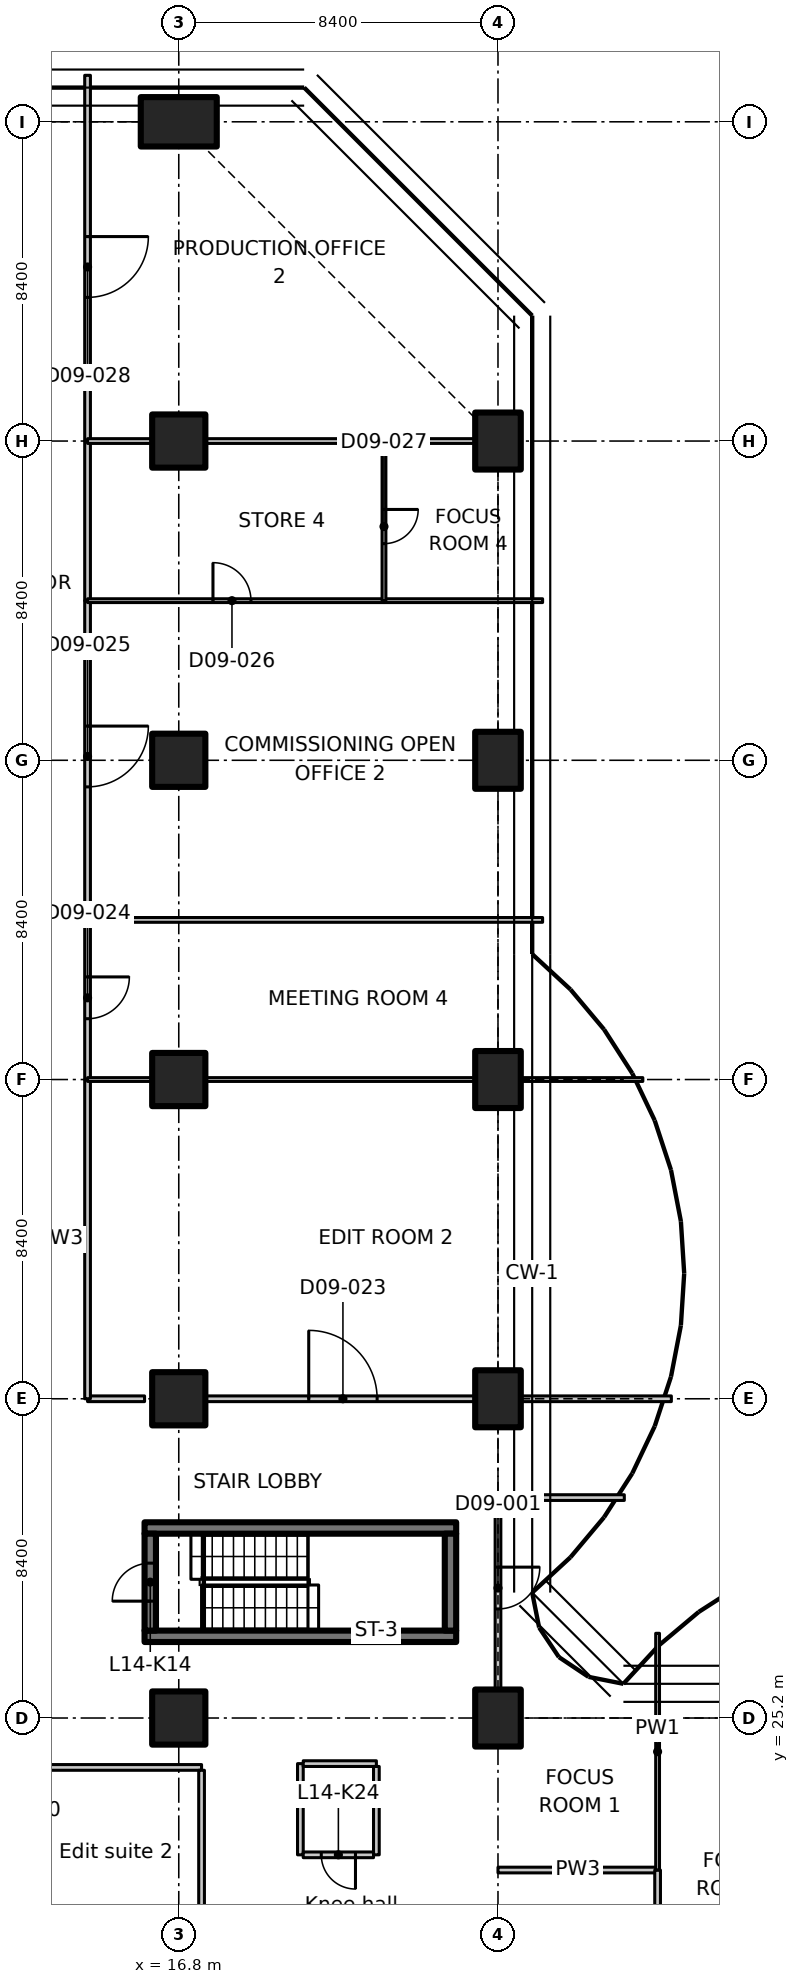
"""IFC4 building model, lengths in metres.
Left out: names, types, materials, properties, quantities, classifications, styles, units other than length and angle.
Written with IfcOpenShell. Run it as: python <this file> out.ifc"""

import sys

from ifc_helpers import new_model, si_unit, direction, frame, frame_2d, origin, origin_2d, place, context, subcontext, project, spatial, polyline, rectangle, outline, extrude, element, fill, save


model = new_model("IFC4")
c1 = context("Model", 3, precision=1e-05, world=origin(), true_north=direction((0.0, 1.0)))
c2 = subcontext(c1, "Body", "Model", "MODEL_VIEW")
j1 = project(units=[si_unit("LENGTHUNIT", "METRE"), si_unit("PLANEANGLEUNIT", "RADIAN")], contexts=[c1])
p1 = place(None, origin())
s1 = spatial("IfcSite", under=j1, at=p1, CompositionType="ELEMENT")
p2 = place(p1, origin())
s2 = spatial("IfcBuilding", under=s1, at=p2, CompositionType="ELEMENT")
p3 = place(p2, frame((0.0, 0.0, 65.3)))
s3 = spatial("IfcBuildingStorey", under=s2, at=p3, CompositionType="ELEMENT", Elevation=65.3)
for number, where, z_axis, x_axis in (
    (1, (16.8, 25.2, 0.0), (0.0, 0.0, 1.0), (1.0, 0.0, 0.0)),
    (2, (16.8, 33.6, 0.0), (0.0, 0.0, 1.0), (1.0, 0.0, 0.0)),
    (3, (16.8, 42.0, 0.0), (0.0, 0.0, 1.0), (1.0, 0.0, 0.0)),
    (4, (16.8, 50.4, 0.0), (0.0, 0.0, 1.0), (1.0, 0.0, 0.0)),
    (5, (16.8, 58.8, 0.0), (0.0, 0.0, 1.0), (1.0, 0.0, 0.0)),
):
    element("IfcColumn", number, at=place(p3, frame(where, z_axis=z_axis, x_axis=x_axis)), inside=s3, PredefinedType="COLUMN", context=c2, shape_type="SweptSolid", body=[
        extrude(rectangle(XDim=1.4, YDim=1.4, at=origin_2d()), origin(), (0.0, 0.0, 1.0), 3.35),
    ])
p4 = place(p3, frame((16.8, 67.2, 0.0), z_axis=(0.0, 0.0, 1.0), x_axis=(0.0, 1.0, 0.0)))
e6 = element("IfcColumn", 6, at=p4, inside=s3, PredefinedType="COLUMN", context=c2, shape_type="SweptSolid", body=[
    extrude(rectangle(XDim=1.3, YDim=2.0, at=origin_2d()), origin(), (0.0, 0.0, 1.0), 3.35),
])
for number, where, z_axis, x_axis in (
    (7, (25.2, 25.2, 0.0), (0.0, 0.0, 1.0), (1.0, 0.0, 0.0)),
    (8, (25.2, 33.6, 0.0), (0.0, 0.0, 1.0), (1.0, 0.0, 0.0)),
    (9, (25.2, 42.0, 0.0), (0.0, 0.0, 1.0), (1.0, 0.0, 0.0)),
    (10, (25.2, 50.4, 0.0), (0.0, 0.0, 1.0), (1.0, 0.0, 0.0)),
    (11, (25.2, 58.8, 0.0), (0.0, 0.0, 1.0), (1.0, 0.0, 0.0)),
):
    element("IfcColumn", number, at=place(p3, frame(where, z_axis=z_axis, x_axis=x_axis)), inside=s3, PredefinedType="COLUMN", context=c2, shape_type="SweptSolid", body=[
        extrude(rectangle(XDim=1.2, YDim=1.5, at=origin_2d()), origin(), (0.0, 0.0, 1.0), 3.35),
    ])
for number, where, z_axis, x_axis in (
    (12, (15.9, 27.35, 0.0), (0.0, 0.0, 1.0), (1.0, 0.0, 0.0)),
    (13, (15.9, 30.2, 0.0), (0.0, 0.0, 1.0), (1.0, 0.0, 0.0)),
):
    element("IfcWall", number, at=place(p3, frame(where, z_axis=z_axis, x_axis=x_axis)), inside=s3, PredefinedType="SHEAR", context=c2, shape_type="SweptSolid", body=[
        extrude(rectangle(XDim=8.2, YDim=0.3, at=frame_2d((4.1, 0.0))), origin(), (0.0, 0.0, 1.0), 3.35),
    ])
p5 = place(p3, frame((16.05, 27.5, 0.0), z_axis=(0.0, 0.0, 1.0), x_axis=(0.0, 1.0, 0.0)))
e14 = element("IfcWall", 14, at=p5, inside=s3, PredefinedType="SHEAR", context=c2, shape_type="SweptSolid", body=[
    extrude(rectangle(XDim=2.55, YDim=0.3, at=frame_2d((1.275, 0.0))), origin(), (0.0, 0.0, 1.0), 3.35),
])
p6 = place(p5, frame((0.775, 0.0, 0.0)))
e15 = element("IfcOpeningElement", 15, at=p6, cuts=e14, PredefinedType="OPENING", context=c2, shape_type="SweptSolid", body=[
    extrude(rectangle(XDim=1.0, YDim=2.1, at=frame_2d((0.5, 1.05))), frame((0.0, 0.16, 0.0), z_axis=(0.0, -1.0, 0.0), x_axis=(1.0, 0.0, 0.0)), (0.0, 0.0, 1.0), 0.32),
])
p7 = place(p3, frame((23.95, 27.5, 0.0), z_axis=(0.0, 0.0, 1.0), x_axis=(0.0, 1.0, 0.0)))
e16 = element("IfcWall", 16, at=p7, inside=s3, PredefinedType="SHEAR", context=c2, shape_type="SweptSolid", body=[
    extrude(rectangle(XDim=2.55, YDim=0.3, at=frame_2d((1.275, 0.0))), origin(), (0.0, 0.0, 1.0), 3.35),
])
p8 = place(p3, frame((12.9, 23.9, 0.0), z_axis=(0.0, 0.0, 1.0), x_axis=(1.0, 0.0, 0.0)))
e17 = element("IfcWall", 17, at=p8, inside=s3, PredefinedType="PARTITIONING", context=c2, shape_type="SweptSolid", body=[
    extrude(rectangle(XDim=4.5, YDim=0.15, at=frame_2d((2.25, 0.0))), origin(), (0.0, 0.0, 1.0), 3.35),
])
p9 = place(p3, frame((17.4, 23.825, 0.0), z_axis=(0.0, 0.0, 1.0), x_axis=(0.0, -1.0, 0.0)))
e18 = element("IfcWall", 18, at=p9, inside=s3, PredefinedType="PARTITIONING", context=c2, shape_type="SweptSolid", body=[
    extrude(rectangle(XDim=4.425, YDim=0.15, at=frame_2d((2.212, 0.0))), origin(), (0.0, 0.0, 1.0), 3.35),
])
p10 = place(p3, frame((20.0, 21.6, 0.0), z_axis=(0.0, 0.0, 1.0), x_axis=(0.0, 1.0, 0.0)))
e19 = element("IfcWall", 19, at=p10, inside=s3, PredefinedType="PARTITIONING", context=c2, shape_type="SweptSolid", body=[
    extrude(rectangle(XDim=2.4, YDim=0.15, at=frame_2d((1.2, 0.0))), origin(), (0.0, 0.0, 1.0), 3.35),
])
p11 = place(p3, frame((20.075, 24.0, 0.0), z_axis=(0.0, 0.0, 1.0), x_axis=(1.0, 0.0, 0.0)))
e20 = element("IfcWall", 20, at=p11, inside=s3, PredefinedType="PARTITIONING", context=c2, shape_type="SweptSolid", body=[
    extrude(rectangle(XDim=1.925, YDim=0.15, at=frame_2d((0.962, 0.0))), origin(), (0.0, 0.0, 1.0), 3.35),
])
p12 = place(p3, frame((22.0, 23.925, 0.0), z_axis=(0.0, 0.0, 1.0), x_axis=(0.0, -1.0, 0.0)))
e21 = element("IfcWall", 21, at=p12, inside=s3, PredefinedType="PARTITIONING", context=c2, shape_type="SweptSolid", body=[
    extrude(rectangle(XDim=2.325, YDim=0.15, at=frame_2d((1.163, 0.0))), origin(), (0.0, 0.0, 1.0), 3.35),
])
p13 = place(p3, frame((21.925, 21.6, 0.0), z_axis=(0.0, 0.0, 1.0), x_axis=(-1.0, 0.0, 0.0)))
e22 = element("IfcWall", 22, at=p13, inside=s3, PredefinedType="PARTITIONING", context=c2, shape_type="SweptSolid", body=[
    extrude(rectangle(XDim=1.85, YDim=0.15, at=frame_2d((0.925, 0.0))), origin(), (0.0, 0.0, 1.0), 3.35),
])
p14 = place(p13, frame((0.475, 0.0, 0.0)))
e23 = element("IfcOpeningElement", 23, at=p14, cuts=e22, PredefinedType="OPENING", context=c2, shape_type="SweptSolid", body=[
    extrude(rectangle(XDim=0.9, YDim=2.1, at=frame_2d((0.45, 1.05))), frame((0.0, 0.085, 0.0), z_axis=(0.0, -1.0, 0.0), x_axis=(1.0, 0.0, 0.0)), (0.0, 0.0, 1.0), 0.17),
])
p15 = place(p3, frame((25.2, 21.2, 0.0), z_axis=(0.0, 0.0, 1.0), x_axis=(1.0, 0.0, 0.0)))
e24 = element("IfcWall", 24, at=p15, inside=s3, PredefinedType="PARTITIONING", context=c2, shape_type="SweptSolid", body=[
    extrude(rectangle(XDim=4.2, YDim=0.15, at=frame_2d((2.1, 0.0))), origin(), (0.0, 0.0, 1.0), 3.33),
])
p16 = place(p3, frame((29.4, 21.2, 0.0), z_axis=(0.0, 0.0, 1.0), x_axis=(0.0, -1.0, 0.0)))
e25 = element("IfcWall", 25, at=p16, inside=s3, PredefinedType="PARTITIONING", context=c2, shape_type="SweptSolid", body=[
    extrude(rectangle(XDim=8.2, YDim=0.15, at=frame_2d((4.1, 0.0))), origin(), (0.0, 0.0, 1.0), 3.33),
])
p17 = place(p16, frame((3.3, 0.0, 0.0)))
e26 = element("IfcOpeningElement", 26, at=p17, cuts=e25, PredefinedType="OPENING", context=c2, shape_type="SweptSolid", body=[
    extrude(rectangle(XDim=1.6, YDim=2.1, at=frame_2d((0.8, 1.05))), frame((0.0, 0.085, 0.0), z_axis=(0.0, -1.0, 0.0), x_axis=(1.0, 0.0, 0.0)), (0.0, 0.0, 1.0), 0.17),
])
p18 = place(p3, frame((29.4, 27.429, 0.0), z_axis=(0.0, 0.0, 1.0), x_axis=(0.0, -1.0, 0.0)))
e27 = element("IfcWall", 27, at=p18, inside=s3, PredefinedType="PARTITIONING", context=c2, shape_type="SweptSolid", body=[
    extrude(outline(polyline([(0.0, 0.0), (6.229, 0.0), (6.229, 3.33), (2.679, 3.33), (2.677, 2.98), (1.781, 2.98), (1.779, 3.33), (0.154, 3.33), (0.0, 3.33), (0.0, 0.0)])), frame((0.0, 0.05, 0.0), z_axis=(0.0, -1.0, 0.0), x_axis=(1.0, 0.0, 0.0)), (0.0, 0.0, 1.0), 0.1),
])
p19 = place(p3, frame((25.2, 31.0, 0.0), z_axis=(0.0, 0.0, 1.0), x_axis=(0.0, -1.0, 0.0)))
e28 = element("IfcWall", 28, at=p19, inside=s3, PredefinedType="PARTITIONING", context=c2, shape_type="SweptSolid", body=[
    extrude(outline(polyline([(0.0, 0.0), (5.03, 0.0), (5.03, 2.98), (0.0, 2.98), (0.0, 0.0)])), frame((0.0, 0.075, 0.0), z_axis=(0.0, -1.0, 0.0), x_axis=(1.0, 0.0, 0.0)), (0.0, 0.0, 1.0), 0.15),
])
p20 = place(p19, frame((1.83, 0.0, 0.0)))
e29 = element("IfcOpeningElement", 29, at=p20, cuts=e28, PredefinedType="OPENING", context=c2, shape_type="SweptSolid", body=[
    extrude(rectangle(XDim=1.1, YDim=2.1, at=frame_2d((0.55, 1.05))), frame((0.0, 0.085, 0.0), z_axis=(0.0, -1.0, 0.0), x_axis=(1.0, 0.0, 0.0)), (0.0, 0.0, 1.0), 0.17),
])
p21 = place(p3, frame((25.2, 31.0, 0.0), z_axis=(0.0, 0.0, 1.0), x_axis=(1.0, 0.0, 0.0)))
e30 = element("IfcWall", 30, at=p21, inside=s3, PredefinedType="PARTITIONING", context=c2, shape_type="SweptSolid", body=[
    extrude(rectangle(XDim=3.324, YDim=0.15, at=frame_2d((1.662, 0.0))), origin(), (0.0, 0.0, 1.0), 2.98),
])
p22 = place(p3, frame((14.4, 33.6, 0.0), z_axis=(0.0, 0.0, 1.0), x_axis=(1.0, 0.0, 0.0)))
e31 = element("IfcWall", 31, at=p22, inside=s3, PredefinedType="PARTITIONING", context=c2, shape_type="SweptSolid", body=[
    extrude(rectangle(XDim=1.5, YDim=0.15, at=frame_2d((0.75, 0.0))), origin(), (0.0, 0.0, 1.0), 3.33),
])
p23 = place(p3, frame((17.52, 33.6, 0.0), z_axis=(0.0, 0.0, 1.0), x_axis=(1.0, 0.0, 0.0)))
e32 = element("IfcWall", 32, at=p23, inside=s3, PredefinedType="PARTITIONING", context=c2, shape_type="SweptSolid", body=[
    extrude(rectangle(XDim=7.06, YDim=0.15, at=frame_2d((3.53, 0.0))), origin(), (0.0, 0.0, 1.0), 3.33),
])
p24 = place(p23, frame((2.7, 0.0, 0.0)))
e33 = element("IfcOpeningElement", 33, at=p24, cuts=e32, PredefinedType="OPENING", context=c2, shape_type="SweptSolid", body=[
    extrude(rectangle(XDim=1.8, YDim=2.1, at=frame_2d((0.9, 1.05))), frame((0.0, 0.085, 0.0), z_axis=(0.0, -1.0, 0.0), x_axis=(1.0, 0.0, 0.0)), (0.0, 0.0, 1.0), 0.17),
])
p25 = place(p3, frame((25.82, 33.6, 0.0), z_axis=(0.0, 0.0, 1.0), x_axis=(1.0, 0.0, 0.0)))
e34 = element("IfcWall", 34, at=p25, inside=s3, PredefinedType="PARTITIONING", context=c2, shape_type="SweptSolid", body=[
    extrude(rectangle(XDim=3.942, YDim=0.15, at=frame_2d((1.971, 0.0))), origin(), (0.0, 0.0, 1.0), 2.98),
])
p26 = place(p3, frame((14.4, 42.0, 0.0), z_axis=(0.0, 0.0, 1.0), x_axis=(0.0, -1.0, 0.0)))
e35 = element("IfcWall", 35, at=p26, inside=s3, PredefinedType="PARTITIONING", context=c2, shape_type="SweptSolid", body=[
    extrude(rectangle(XDim=8.4, YDim=0.15, at=frame_2d((4.2, 0.0))), origin(), (0.0, 0.0, 1.0), 3.33),
])
p27 = place(p3, frame((14.4, 46.2, 0.0), z_axis=(0.0, 0.0, 1.0), x_axis=(0.0, -1.0, 0.0)))
e36 = element("IfcWall", 36, at=p27, inside=s3, PredefinedType="PARTITIONING", context=c2, shape_type="SweptSolid", body=[
    extrude(rectangle(XDim=4.2, YDim=0.15, at=frame_2d((2.1, 0.0))), origin(), (0.0, 0.0, 1.0), 3.33),
])
p28 = place(p27, frame((1.5, 0.0, 0.0)))
e37 = element("IfcOpeningElement", 37, at=p28, cuts=e36, PredefinedType="OPENING", context=c2, shape_type="SweptSolid", body=[
    extrude(rectangle(XDim=1.1, YDim=2.1, at=frame_2d((0.55, 1.05))), frame((0.0, 0.085, 0.0), z_axis=(0.0, -1.0, 0.0), x_axis=(1.0, 0.0, 0.0)), (0.0, 0.0, 1.0), 0.17),
])
p29 = place(p3, frame((14.4, 54.6, 0.0), z_axis=(0.0, 0.0, 1.0), x_axis=(0.0, -1.0, 0.0)))
e38 = element("IfcWall", 38, at=p29, inside=s3, PredefinedType="PARTITIONING", context=c2, shape_type="SweptSolid", body=[
    extrude(rectangle(XDim=8.4, YDim=0.15, at=frame_2d((4.2, 0.0))), origin(), (0.0, 0.0, 1.0), 3.33),
])
p30 = place(p29, frame((3.3, 0.0, 0.0)))
e39 = element("IfcOpeningElement", 39, at=p30, cuts=e38, PredefinedType="OPENING", context=c2, shape_type="SweptSolid", body=[
    extrude(rectangle(XDim=1.6, YDim=2.1, at=frame_2d((0.8, 1.05))), frame((0.0, 0.085, 0.0), z_axis=(0.0, -1.0, 0.0), x_axis=(1.0, 0.0, 0.0)), (0.0, 0.0, 1.0), 0.17),
])
p31 = place(p3, frame((14.4, 58.8, 0.0), z_axis=(0.0, 0.0, 1.0), x_axis=(0.0, -1.0, 0.0)))
e40 = element("IfcWall", 40, at=p31, inside=s3, PredefinedType="PARTITIONING", context=c2, shape_type="SweptSolid", body=[
    extrude(rectangle(XDim=4.2, YDim=0.15, at=frame_2d((2.1, 0.0))), origin(), (0.0, 0.0, 1.0), 3.33),
])
p32 = place(p3, frame((14.4, 68.423, 0.0), z_axis=(0.0, 0.0, 1.0), x_axis=(0.0, -1.0, 0.0)))
e41 = element("IfcWall", 41, at=p32, inside=s3, PredefinedType="PARTITIONING", context=c2, shape_type="SweptSolid", body=[
    extrude(outline(polyline([(0.0, 0.0), (9.623, 0.0), (9.623, 3.33), (1.673, 3.33), (1.671, 2.98), (0.775, 2.98), (0.773, 3.33), (0.143, 3.33), (0.0, 3.33), (0.0, 0.0)])), frame((0.0, 0.075, 0.0), z_axis=(0.0, -1.0, 0.0), x_axis=(1.0, 0.0, 0.0)), (0.0, 0.0, 1.0), 0.15),
])
p33 = place(p32, frame((4.243, 0.0, 0.0)))
e42 = element("IfcOpeningElement", 42, at=p33, cuts=e41, PredefinedType="OPENING", context=c2, shape_type="SweptSolid", body=[
    extrude(rectangle(XDim=1.6, YDim=2.1, at=frame_2d((0.8, 1.05))), frame((0.0, 0.085, 0.0), z_axis=(0.0, -1.0, 0.0), x_axis=(1.0, 0.0, 0.0)), (0.0, 0.0, 1.0), 0.17),
])
p34 = place(p3, frame((14.4, 42.0, 0.0), z_axis=(0.0, 0.0, 1.0), x_axis=(1.0, 0.0, 0.0)))
e43 = element("IfcWall", 43, at=p34, inside=s3, PredefinedType="PARTITIONING", context=c2, shape_type="SweptSolid", body=[
    extrude(rectangle(XDim=1.68, YDim=0.1, at=frame_2d((0.84, 0.0))), origin(), (0.0, 0.0, 1.0), 3.33),
])
p35 = place(p3, frame((17.52, 42.0, 0.0), z_axis=(0.0, 0.0, 1.0), x_axis=(1.0, 0.0, 0.0)))
e44 = element("IfcWall", 44, at=p35, inside=s3, PredefinedType="PARTITIONING", context=c2, shape_type="SweptSolid", body=[
    extrude(rectangle(XDim=7.06, YDim=0.1, at=frame_2d((3.53, 0.0))), origin(), (0.0, 0.0, 1.0), 3.33),
])
p36 = place(p3, frame((25.82, 42.0, 0.0), z_axis=(0.0, 0.0, 1.0), x_axis=(1.0, 0.0, 0.0)))
e45 = element("IfcWall", 45, at=p36, inside=s3, PredefinedType="PARTITIONING", context=c2, shape_type="SweptSolid", body=[
    extrude(rectangle(XDim=3.191, YDim=0.1, at=frame_2d((1.596, 0.0))), origin(), (0.0, 0.0, 1.0), 2.98),
])
p37 = place(p3, frame((14.4, 46.2, 0.0), z_axis=(0.0, 0.0, 1.0), x_axis=(1.0, 0.0, 0.0)))
e46 = element("IfcWall", 46, at=p37, inside=s3, PredefinedType="PARTITIONING", context=c2, shape_type="SweptSolid", body=[
    extrude(outline(polyline([(0.0, 0.0), (11.974, 0.0), (11.974, 3.33), (11.9, 3.33), (11.25, 3.33), (11.248, 2.98), (10.352, 2.98), (10.35, 3.33), (0.0, 3.33), (0.0, 0.0)])), frame((0.0, 0.062, 0.0), z_axis=(0.0, -1.0, 0.0), x_axis=(1.0, 0.0, 0.0)), (0.0, 0.0, 1.0), 0.125),
])
p38 = place(p3, frame((14.4, 54.6, 0.0), z_axis=(0.0, 0.0, 1.0), x_axis=(1.0, 0.0, 0.0)))
e47 = element("IfcWall", 47, at=p38, inside=s3, PredefinedType="PARTITIONING", context=c2, shape_type="SweptSolid", body=[
    extrude(rectangle(XDim=7.8, YDim=0.1, at=frame_2d((3.9, 0.0))), origin(), (0.0, 0.0, 1.0), 3.33),
])
p39 = place(p38, frame((3.3, 0.0, 0.0)))
e48 = element("IfcOpeningElement", 48, at=p39, cuts=e47, PredefinedType="OPENING", context=c2, shape_type="SweptSolid", body=[
    extrude(rectangle(XDim=1.0, YDim=2.1, at=frame_2d((0.5, 1.05))), frame((0.0, 0.06, 0.0), z_axis=(0.0, -1.0, 0.0), x_axis=(1.0, 0.0, 0.0)), (0.0, 0.0, 1.0), 0.12),
])
p40 = place(p3, frame((22.2, 54.6, 0.0), z_axis=(0.0, 0.0, 1.0), x_axis=(1.0, 0.0, 0.0)))
e49 = element("IfcWall", 49, at=p40, inside=s3, PredefinedType="PARTITIONING", context=c2, shape_type="SweptSolid", body=[
    extrude(rectangle(XDim=4.174, YDim=0.1, at=frame_2d((2.087, 0.0))), origin(), (0.0, 0.0, 1.0), 2.98),
])
p41 = place(p3, frame((22.2, 58.8, 0.0), z_axis=(0.0, 0.0, 1.0), x_axis=(0.0, -1.0, 0.0)))
e50 = element("IfcWall", 50, at=p41, inside=s3, PredefinedType="PARTITIONING", context=c2, shape_type="SweptSolid", body=[
    extrude(rectangle(XDim=4.2, YDim=0.1, at=frame_2d((2.1, 0.0))), origin(), (0.0, 0.0, 1.0), 3.33),
])
p42 = place(p41, frame((1.8, 0.0, 0.0)))
e51 = element("IfcOpeningElement", 51, at=p42, cuts=e50, PredefinedType="OPENING", context=c2, shape_type="SweptSolid", body=[
    extrude(rectangle(XDim=0.9, YDim=2.1, at=frame_2d((0.45, 1.05))), frame((0.0, 0.06, 0.0), z_axis=(0.0, -1.0, 0.0), x_axis=(1.0, 0.0, 0.0)), (0.0, 0.0, 1.0), 0.12),
])
p43 = place(p3, frame((14.4, 58.8, 0.0), z_axis=(0.0, 0.0, 1.0), x_axis=(1.0, 0.0, 0.0)))
e52 = element("IfcWall", 52, at=p43, inside=s3, PredefinedType="PARTITIONING", context=c2, shape_type="SweptSolid", body=[
    extrude(rectangle(XDim=1.68, YDim=0.125, at=frame_2d((0.84, 0.0))), origin(), (0.0, 0.0, 1.0), 3.33),
])
p44 = place(p3, frame((17.52, 58.8, 0.0), z_axis=(0.0, 0.0, 1.0), x_axis=(1.0, 0.0, 0.0)))
e53 = element("IfcWall", 53, at=p44, inside=s3, PredefinedType="PARTITIONING", context=c2, shape_type="SweptSolid", body=[
    extrude(rectangle(XDim=4.68, YDim=0.125, at=frame_2d((2.34, 0.0))), origin(), (0.0, 0.0, 1.0), 3.33),
])
p45 = place(p3, frame((22.2, 58.8, 0.0), z_axis=(0.0, 0.0, 1.0), x_axis=(1.0, 0.0, 0.0)))
e54 = element("IfcWall", 54, at=p45, inside=s3, PredefinedType="PARTITIONING", context=c2, shape_type="SweptSolid", body=[
    extrude(rectangle(XDim=2.38, YDim=0.125, at=frame_2d((1.19, 0.0))), origin(), (0.0, 0.0, 1.0), 3.33),
])
p46 = place(p6, origin())
e55 = element("IfcDoor", 55, at=p46, inside=s3, OperationType="SINGLE_SWING_LEFT", PredefinedType="DOOR", context=c2, shape_type="SweptSolid", body=[
    extrude(rectangle(XDim=1.0, YDim=2.1, at=frame_2d((0.5, 1.05))), frame((0.0, 0.025, 0.0), z_axis=(0.0, -1.0, 0.0), x_axis=(1.0, 0.0, 0.0)), (0.0, 0.0, 1.0), 0.05),
])
fill(e15, e55)
p47 = place(p14, origin())
e56 = element("IfcDoor", 56, at=p47, inside=s3, OperationType="SINGLE_SWING_LEFT", PredefinedType="DOOR", context=c2, shape_type="SweptSolid", body=[
    extrude(rectangle(XDim=0.9, YDim=2.1, at=frame_2d((0.45, 1.05))), frame((0.0, 0.025, 0.0), z_axis=(0.0, -1.0, 0.0), x_axis=(1.0, 0.0, 0.0)), (0.0, 0.0, 1.0), 0.05),
])
fill(e23, e56)
p48 = place(p20, origin())
e57 = element("IfcDoor", 57, at=p48, inside=s3, OperationType="SINGLE_SWING_RIGHT", PredefinedType="DOOR", context=c2, shape_type="SweptSolid", body=[
    extrude(rectangle(XDim=1.1, YDim=2.1, at=frame_2d((0.55, 1.05))), frame((0.0, 0.025, 0.0), z_axis=(0.0, -1.0, 0.0), x_axis=(1.0, 0.0, 0.0)), (0.0, 0.0, 1.0), 0.05),
])
fill(e29, e57)
p49 = place(p24, origin())
e58 = element("IfcDoor", 58, at=p49, inside=s3, OperationType="DOUBLE_DOOR_SINGLE_SWING", PredefinedType="DOOR", context=c2, shape_type="SweptSolid", body=[
    extrude(rectangle(XDim=1.8, YDim=2.1, at=frame_2d((0.9, 1.05))), frame((0.0, 0.025, 0.0), z_axis=(0.0, -1.0, 0.0), x_axis=(1.0, 0.0, 0.0)), (0.0, 0.0, 1.0), 0.05),
])
fill(e33, e58)
p50 = place(p28, origin())
e59 = element("IfcDoor", 59, at=p50, inside=s3, OperationType="SINGLE_SWING_LEFT", PredefinedType="DOOR", context=c2, shape_type="SweptSolid", body=[
    extrude(rectangle(XDim=1.1, YDim=2.1, at=frame_2d((0.55, 1.05))), frame((0.0, 0.025, 0.0), z_axis=(0.0, -1.0, 0.0), x_axis=(1.0, 0.0, 0.0)), (0.0, 0.0, 1.0), 0.05),
])
fill(e37, e59)
p51 = place(p30, origin())
e60 = element("IfcDoor", 60, at=p51, inside=s3, OperationType="DOUBLE_DOOR_SINGLE_SWING", PredefinedType="DOOR", context=c2, shape_type="SweptSolid", body=[
    extrude(rectangle(XDim=1.6, YDim=2.1, at=frame_2d((0.8, 1.05))), frame((0.0, 0.025, 0.0), z_axis=(0.0, -1.0, 0.0), x_axis=(1.0, 0.0, 0.0)), (0.0, 0.0, 1.0), 0.05),
])
fill(e39, e60)
p52 = place(p39, origin())
e61 = element("IfcDoor", 61, at=p52, inside=s3, OperationType="SINGLE_SWING_LEFT", PredefinedType="DOOR", context=c2, shape_type="SweptSolid", body=[
    extrude(rectangle(XDim=1.0, YDim=2.1, at=frame_2d((0.5, 1.05))), frame((0.0, 0.025, 0.0), z_axis=(0.0, -1.0, 0.0), x_axis=(1.0, 0.0, 0.0)), (0.0, 0.0, 1.0), 0.05),
])
fill(e48, e61)
p53 = place(p42, origin())
e62 = element("IfcDoor", 62, at=p53, inside=s3, OperationType="SINGLE_SWING_LEFT", PredefinedType="DOOR", context=c2, shape_type="SweptSolid", body=[
    extrude(rectangle(XDim=0.9, YDim=2.1, at=frame_2d((0.45, 1.05))), frame((0.0, 0.025, 0.0), z_axis=(0.0, -1.0, 0.0), x_axis=(1.0, 0.0, 0.0)), (0.0, 0.0, 1.0), 0.05),
])
fill(e51, e62)
p54 = place(p33, origin())
e63 = element("IfcDoor", 63, at=p54, inside=s3, OperationType="DOUBLE_DOOR_SINGLE_SWING", PredefinedType="DOOR", context=c2, shape_type="SweptSolid", body=[
    extrude(rectangle(XDim=1.6, YDim=2.1, at=frame_2d((0.8, 1.05))), frame((0.0, 0.025, 0.0), z_axis=(0.0, -1.0, 0.0), x_axis=(1.0, 0.0, 0.0)), (0.0, 0.0, 1.0), 0.05),
])
fill(e42, e63)
save(model, sys.argv[1])
